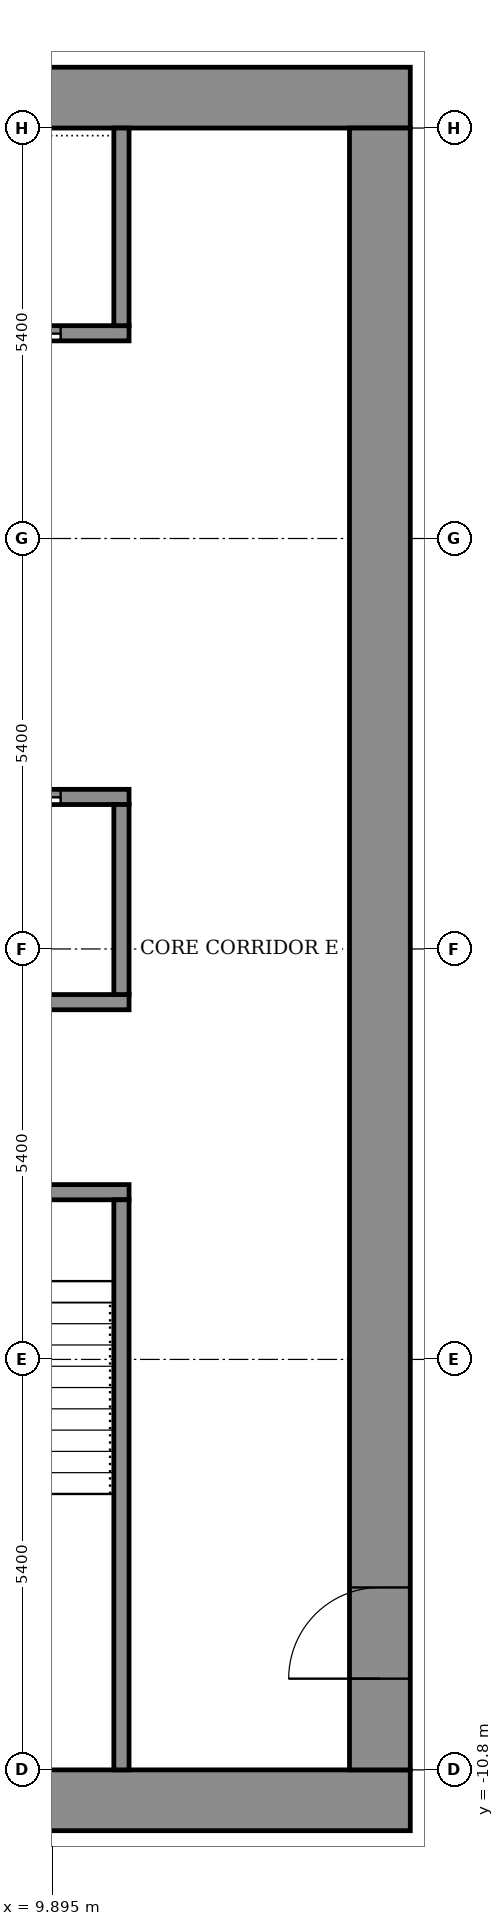
"""IFC4 building model, lengths in metres.
Left out: names, types, materials, properties, quantities, classifications, styles, units other than length and angle.
Written with IfcOpenShell. Run it as: python <this file> out.ifc"""

import sys

from ifc_helpers import new_model, si_unit, direction, frame, frame_2d, origin, place, context, subcontext, project, spatial, rectangle, extrude, element, fill, save


model = new_model("IFC4")
c1 = context("Model", 3, precision=1e-05, world=origin(), true_north=direction((0.0, 1.0)))
c2 = subcontext(c1, "Body", "Model", "MODEL_VIEW")
j1 = project(units=[si_unit("LENGTHUNIT", "METRE"), si_unit("PLANEANGLEUNIT", "RADIAN")], contexts=[c1])
p1 = place(None, origin())
s1 = spatial("IfcSite", under=j1, at=p1, CompositionType="ELEMENT")
p2 = place(p1, origin())
s2 = spatial("IfcBuilding", under=s1, at=p2, CompositionType="ELEMENT")
p3 = place(p2, frame((0.0, 0.0, 208.7)))
s3 = spatial("IfcBuildingStorey", under=s2, at=p3, CompositionType="ELEMENT", Elevation=208.7)
for number, where, z_axis, x_axis in (
    (1, (-14.6, -11.2, 0.0), (0.0, 0.0, 1.0), (1.0, 0.0, 0.0)),
    (2, (-14.6, 11.2, 0.0), (0.0, 0.0, 1.0), (1.0, 0.0, 0.0)),
):
    element("IfcWall", number, at=place(p3, frame(where, z_axis=z_axis, x_axis=x_axis)), inside=s3, PredefinedType="SHEAR", context=c2, shape_type="SweptSolid", body=[
        extrude(rectangle(XDim=29.2, YDim=0.8, at=frame_2d((14.6, 0.0))), origin(), (0.0, 0.0, 1.0), 3.6),
    ])
p4 = place(p3, frame((14.2, -10.8, 0.0), z_axis=(0.0, 0.0, 1.0), x_axis=(0.0, 1.0, 0.0)))
e3 = element("IfcWall", 3, at=p4, inside=s3, PredefinedType="SHEAR", context=c2, shape_type="SweptSolid", body=[
    extrude(rectangle(XDim=21.6, YDim=0.8, at=frame_2d((10.8, 0.0))), origin(), (0.0, 0.0, 1.0), 3.6),
])
p5 = place(p4, frame((1.2, 0.0, 0.0)))
e4 = element("IfcOpeningElement", 4, at=p5, cuts=e3, PredefinedType="OPENING", context=c2, shape_type="SweptSolid", body=[
    extrude(rectangle(XDim=1.2, YDim=2.1, at=frame_2d((0.6, 1.05))), frame((0.0, 0.41, 0.0), z_axis=(0.0, -1.0, 0.0), x_axis=(1.0, 0.0, 0.0)), (0.0, 0.0, 1.0), 0.82),
])
p6 = place(p3, frame((-10.9, -3.2, 0.0), z_axis=(0.0, 0.0, 1.0), x_axis=(1.0, 0.0, 0.0)))
e5 = element("IfcWall", 5, at=p6, inside=s3, PredefinedType="SHEAR", context=c2, shape_type="SweptSolid", body=[
    extrude(rectangle(XDim=21.8, YDim=0.2, at=frame_2d((10.9, 0.0))), origin(), (0.0, 0.0, 1.0), 3.05),
])
p7 = place(p6, frame((1.075, 0.0, 0.0)))
e6 = element("IfcOpeningElement", 6, at=p7, cuts=e5, PredefinedType="OPENING", context=c2, shape_type="SweptSolid", body=[
    extrude(rectangle(XDim=1.1, YDim=2.1, at=frame_2d((0.55, 1.05))), frame((0.0, 0.11, 0.0), z_axis=(0.0, -1.0, 0.0), x_axis=(1.0, 0.0, 0.0)), (0.0, 0.0, 1.0), 0.22),
])
p8 = place(p6, frame((10.325, 0.0, 0.0)))
e7 = element("IfcOpeningElement", 7, at=p8, cuts=e5, PredefinedType="OPENING", context=c2, shape_type="SweptSolid", body=[
    extrude(rectangle(XDim=1.1, YDim=2.1, at=frame_2d((0.55, 1.05))), frame((0.0, 0.11, 0.0), z_axis=(0.0, -1.0, 0.0), x_axis=(1.0, 0.0, 0.0)), (0.0, 0.0, 1.0), 0.22),
])
p9 = place(p6, frame((19.625, 0.0, 0.0)))
e8 = element("IfcOpeningElement", 8, at=p9, cuts=e5, PredefinedType="OPENING", context=c2, shape_type="SweptSolid", body=[
    extrude(rectangle(XDim=1.1, YDim=2.1, at=frame_2d((0.55, 1.05))), frame((0.0, 0.11, 0.0), z_axis=(0.0, -1.0, 0.0), x_axis=(1.0, 0.0, 0.0)), (0.0, 0.0, 1.0), 0.22),
])
p10 = place(p6, frame((5.7, 0.0, 0.0)))
e9 = element("IfcOpeningElement", 9, at=p10, cuts=e5, PredefinedType="OPENING", context=c2, shape_type="SweptSolid", body=[
    extrude(rectangle(XDim=1.1, YDim=2.1, at=frame_2d((0.55, 1.05))), frame((0.0, 0.11, 0.0), z_axis=(0.0, -1.0, 0.0), x_axis=(1.0, 0.0, 0.0)), (0.0, 0.0, 1.0), 0.22),
])
p11 = place(p6, frame((14.975, 0.0, 0.0)))
e10 = element("IfcOpeningElement", 10, at=p11, cuts=e5, PredefinedType="OPENING", context=c2, shape_type="SweptSolid", body=[
    extrude(rectangle(XDim=1.1, YDim=2.1, at=frame_2d((0.55, 1.05))), frame((0.0, 0.11, 0.0), z_axis=(0.0, -1.0, 0.0), x_axis=(1.0, 0.0, 0.0)), (0.0, 0.0, 1.0), 0.22),
])
p12 = place(p3, frame((-10.9, -0.7, 0.0), z_axis=(0.0, 0.0, 1.0), x_axis=(1.0, 0.0, 0.0)))
e11 = element("IfcWall", 11, at=p12, inside=s3, PredefinedType="SHEAR", context=c2, shape_type="SweptSolid", body=[
    extrude(rectangle(XDim=21.8, YDim=0.2, at=frame_2d((10.9, 0.0))), origin(), (0.0, 0.0, 1.0), 3.05),
])
p13 = place(p3, frame((-10.9, 2.0, 0.0), z_axis=(0.0, 0.0, 1.0), x_axis=(1.0, 0.0, 0.0)))
e12 = element("IfcWall", 12, at=p13, inside=s3, PredefinedType="SHEAR", context=c2, shape_type="SweptSolid", body=[
    extrude(rectangle(XDim=21.8, YDim=0.2, at=frame_2d((10.9, 0.0))), origin(), (0.0, 0.0, 1.0), 3.05),
])
p14 = place(p13, frame((14.4, 0.0, 0.0)))
e13 = element("IfcOpeningElement", 13, at=p14, cuts=e12, PredefinedType="OPENING", context=c2, shape_type="SweptSolid", body=[
    extrude(rectangle(XDim=1.1, YDim=2.1, at=frame_2d((0.55, 1.05))), frame((0.0, 0.11, 0.0), z_axis=(0.0, -1.0, 0.0), x_axis=(1.0, 0.0, 0.0)), (0.0, 0.0, 1.0), 0.22),
])
p15 = place(p13, frame((17.1, 0.0, 0.0)))
e14 = element("IfcOpeningElement", 14, at=p15, cuts=e12, PredefinedType="OPENING", context=c2, shape_type="SweptSolid", body=[
    extrude(rectangle(XDim=1.1, YDim=2.1, at=frame_2d((0.55, 1.05))), frame((0.0, 0.11, 0.0), z_axis=(0.0, -1.0, 0.0), x_axis=(1.0, 0.0, 0.0)), (0.0, 0.0, 1.0), 0.22),
])
p16 = place(p13, frame((19.8, 0.0, 0.0)))
e15 = element("IfcOpeningElement", 15, at=p16, cuts=e12, PredefinedType="OPENING", context=c2, shape_type="SweptSolid", body=[
    extrude(rectangle(XDim=1.1, YDim=2.1, at=frame_2d((0.55, 1.05))), frame((0.0, 0.11, 0.0), z_axis=(0.0, -1.0, 0.0), x_axis=(1.0, 0.0, 0.0)), (0.0, 0.0, 1.0), 0.22),
])
p17 = place(p13, frame((2.35, 0.0, 0.0)))
e16 = element("IfcOpeningElement", 16, at=p17, cuts=e12, PredefinedType="OPENING", context=c2, shape_type="SweptSolid", body=[
    extrude(rectangle(XDim=0.9, YDim=2.1, at=frame_2d((0.45, 1.05))), frame((0.0, 0.11, 0.0), z_axis=(0.0, -1.0, 0.0), x_axis=(1.0, 0.0, 0.0)), (0.0, 0.0, 1.0), 0.22),
])
p18 = place(p13, frame((9.1, 0.0, 0.0)))
e17 = element("IfcOpeningElement", 17, at=p18, cuts=e12, PredefinedType="OPENING", context=c2, shape_type="SweptSolid", body=[
    extrude(rectangle(XDim=0.9, YDim=2.1, at=frame_2d((0.45, 1.05))), frame((0.0, 0.11, 0.0), z_axis=(0.0, -1.0, 0.0), x_axis=(1.0, 0.0, 0.0)), (0.0, 0.0, 1.0), 0.22),
])
p19 = place(p3, frame((-10.9, 8.1, 0.0), z_axis=(0.0, 0.0, 1.0), x_axis=(1.0, 0.0, 0.0)))
e18 = element("IfcWall", 18, at=p19, inside=s3, PredefinedType="SHEAR", context=c2, shape_type="SweptSolid", body=[
    extrude(rectangle(XDim=21.8, YDim=0.2, at=frame_2d((10.9, 0.0))), origin(), (0.0, 0.0, 1.0), 3.05),
])
p20 = place(p19, frame((14.4, 0.0, 0.0)))
e19 = element("IfcOpeningElement", 19, at=p20, cuts=e18, PredefinedType="OPENING", context=c2, shape_type="SweptSolid", body=[
    extrude(rectangle(XDim=1.1, YDim=2.1, at=frame_2d((0.55, 1.05))), frame((0.0, 0.11, 0.0), z_axis=(0.0, -1.0, 0.0), x_axis=(1.0, 0.0, 0.0)), (0.0, 0.0, 1.0), 0.22),
])
p21 = place(p19, frame((17.1, 0.0, 0.0)))
e20 = element("IfcOpeningElement", 20, at=p21, cuts=e18, PredefinedType="OPENING", context=c2, shape_type="SweptSolid", body=[
    extrude(rectangle(XDim=1.1, YDim=2.1, at=frame_2d((0.55, 1.05))), frame((0.0, 0.11, 0.0), z_axis=(0.0, -1.0, 0.0), x_axis=(1.0, 0.0, 0.0)), (0.0, 0.0, 1.0), 0.22),
])
p22 = place(p19, frame((19.8, 0.0, 0.0)))
e21 = element("IfcOpeningElement", 21, at=p22, cuts=e18, PredefinedType="OPENING", context=c2, shape_type="SweptSolid", body=[
    extrude(rectangle(XDim=1.1, YDim=2.1, at=frame_2d((0.55, 1.05))), frame((0.0, 0.11, 0.0), z_axis=(0.0, -1.0, 0.0), x_axis=(1.0, 0.0, 0.0)), (0.0, 0.0, 1.0), 0.22),
])
p23 = place(p19, frame((2.35, 0.0, 0.0)))
e22 = element("IfcOpeningElement", 22, at=p23, cuts=e18, PredefinedType="OPENING", context=c2, shape_type="SweptSolid", body=[
    extrude(rectangle(XDim=0.9, YDim=2.1, at=frame_2d((0.45, 1.05))), frame((0.0, 0.11, 0.0), z_axis=(0.0, -1.0, 0.0), x_axis=(1.0, 0.0, 0.0)), (0.0, 0.0, 1.0), 0.22),
])
p24 = place(p19, frame((9.1, 0.0, 0.0)))
e23 = element("IfcOpeningElement", 23, at=p24, cuts=e18, PredefinedType="OPENING", context=c2, shape_type="SweptSolid", body=[
    extrude(rectangle(XDim=0.9, YDim=2.1, at=frame_2d((0.45, 1.05))), frame((0.0, 0.11, 0.0), z_axis=(0.0, -1.0, 0.0), x_axis=(1.0, 0.0, 0.0)), (0.0, 0.0, 1.0), 0.22),
])
p25 = place(p3, frame((10.8, -10.8, 0.0), z_axis=(0.0, 0.0, 1.0), x_axis=(0.0, 1.0, 0.0)))
e24 = element("IfcWall", 24, at=p25, inside=s3, PredefinedType="SHEAR", context=c2, shape_type="SweptSolid", body=[
    extrude(rectangle(XDim=7.5, YDim=0.2, at=frame_2d((3.75, 0.0))), origin(), (0.0, 0.0, 1.0), 3.05),
])
p26 = place(p3, frame((10.8, -0.6, 0.0), z_axis=(0.0, 0.0, 1.0), x_axis=(0.0, 1.0, 0.0)))
e25 = element("IfcWall", 25, at=p26, inside=s3, PredefinedType="SHEAR", context=c2, shape_type="SweptSolid", body=[
    extrude(rectangle(XDim=2.5, YDim=0.2, at=frame_2d((1.25, 0.0))), origin(), (0.0, 0.0, 1.0), 3.05),
])
p27 = place(p3, frame((10.8, 8.2, 0.0), z_axis=(0.0, 0.0, 1.0), x_axis=(0.0, 1.0, 0.0)))
e26 = element("IfcWall", 26, at=p27, inside=s3, PredefinedType="SHEAR", context=c2, shape_type="SweptSolid", body=[
    extrude(rectangle(XDim=2.6, YDim=0.2, at=frame_2d((1.3, 0.0))), origin(), (0.0, 0.0, 1.0), 3.05),
])
p28 = place(p5, origin())
e27 = element("IfcDoor", 27, at=p28, inside=s3, OperationType="DOUBLE_DOOR_SINGLE_SWING", PredefinedType="DOOR", context=c2, shape_type="SweptSolid", body=[
    extrude(rectangle(XDim=1.2, YDim=2.1, at=frame_2d((0.6, 1.05))), frame((0.0, 0.025, 0.0), z_axis=(0.0, -1.0, 0.0), x_axis=(1.0, 0.0, 0.0)), (0.0, 0.0, 1.0), 0.05),
])
fill(e4, e27)
p29 = place(p16, origin())
e28 = element("IfcDoor", 28, at=p29, inside=s3, OperationType="SLIDING_TO_LEFT", PredefinedType="DOOR", context=c2, shape_type="SweptSolid", body=[
    extrude(rectangle(XDim=1.1, YDim=2.1, at=frame_2d((0.55, 1.05))), frame((0.0, 0.025, 0.0), z_axis=(0.0, -1.0, 0.0), x_axis=(1.0, 0.0, 0.0)), (0.0, 0.0, 1.0), 0.05),
])
fill(e15, e28)
p30 = place(p22, origin())
e29 = element("IfcDoor", 29, at=p30, inside=s3, OperationType="SLIDING_TO_LEFT", PredefinedType="DOOR", context=c2, shape_type="SweptSolid", body=[
    extrude(rectangle(XDim=1.1, YDim=2.1, at=frame_2d((0.55, 1.05))), frame((0.0, 0.025, 0.0), z_axis=(0.0, -1.0, 0.0), x_axis=(1.0, 0.0, 0.0)), (0.0, 0.0, 1.0), 0.05),
])
fill(e21, e29)
save(model, sys.argv[1])
